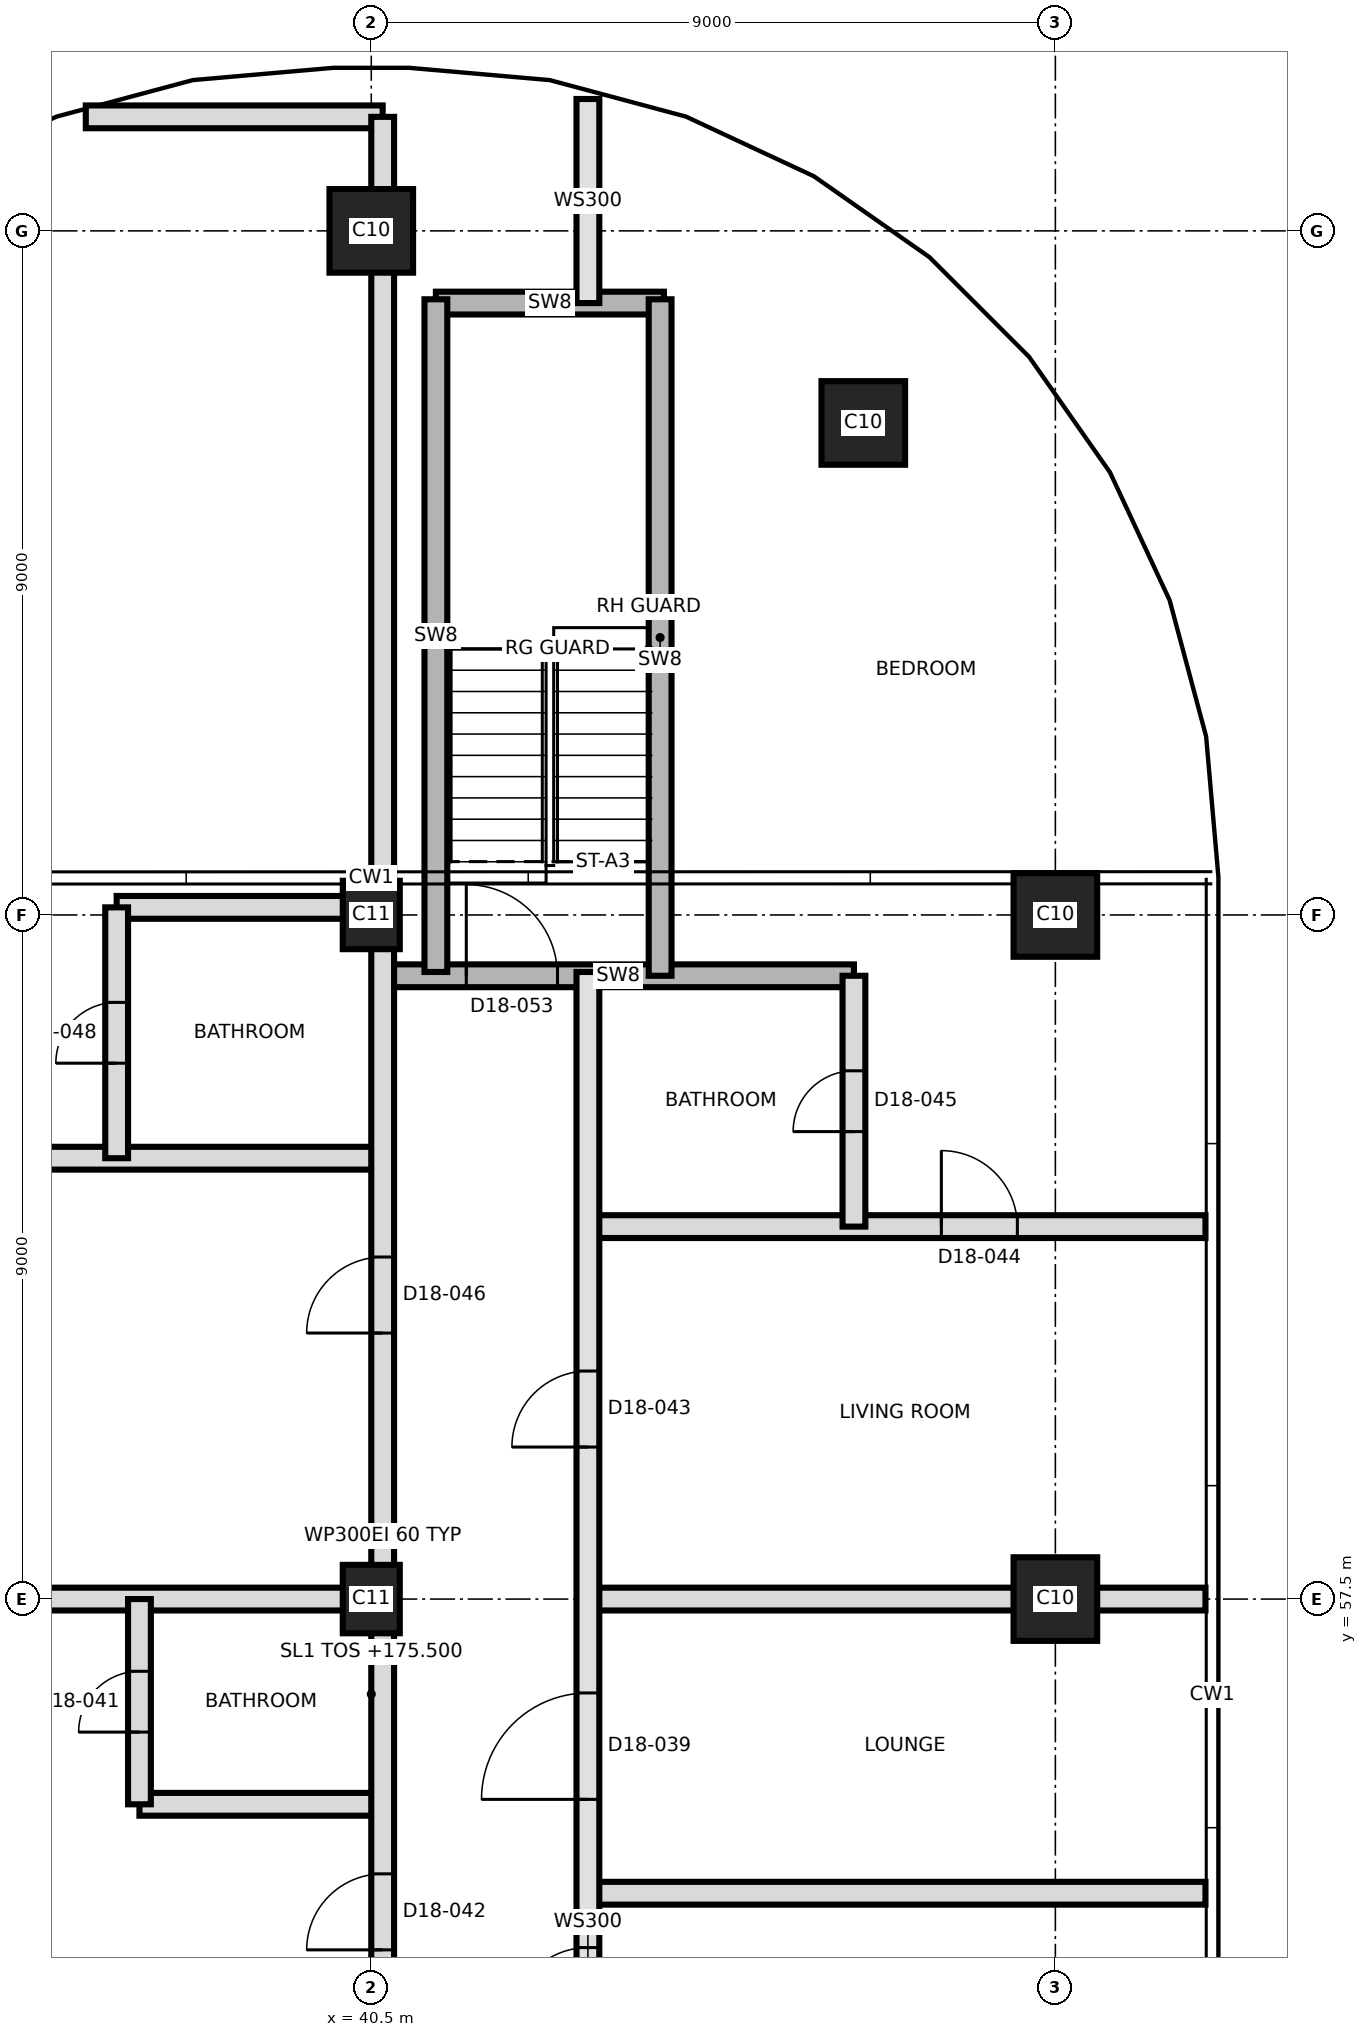
"""IFC4 building model, lengths in metres.
Left out: names, types, materials, properties, quantities, classifications, styles, units other than length and angle.
Written with IfcOpenShell. Run it as: python <this file> out.ifc"""

import sys

from ifc_helpers import new_model, si_unit, direction, frame, frame_2d, origin, origin_2d, place, context, subcontext, project, spatial, rectangle, extrude, element, fill, save


model = new_model("IFC4")
c1 = context("Model", 3, precision=1e-05, world=origin(), true_north=direction((0.0, 1.0)))
c2 = subcontext(c1, "Body", "Model", "MODEL_VIEW")
j1 = project(units=[si_unit("LENGTHUNIT", "METRE"), si_unit("PLANEANGLEUNIT", "RADIAN")], contexts=[c1])
p1 = place(None, origin())
s1 = spatial("IfcSite", under=j1, at=p1, CompositionType="ELEMENT")
p2 = place(p1, origin())
s2 = spatial("IfcBuilding", under=s1, at=p2, CompositionType="ELEMENT")
p3 = place(p2, frame((0.0, 0.0, 175.5)))
s3 = spatial("IfcBuildingStorey", under=s2, at=p3, CompositionType="ELEMENT", Elevation=175.5)
p4 = place(p3, frame((40.5, 57.5, 0.0), z_axis=(0.0, 0.0, 1.0), x_axis=(0.0, 1.0, 0.0)))
e1 = element("IfcColumn", 1, at=p4, inside=s3, PredefinedType="COLUMN", context=c2, shape_type="SweptSolid", body=[
    extrude(rectangle(XDim=0.9, YDim=0.75, at=origin_2d()), origin(), (0.0, 0.0, 1.0), 3.7),
])
p5 = place(p3, frame((49.5, 57.5, 0.0), z_axis=(0.0, 0.0, 1.0), x_axis=(1.0, 0.0, 0.0)))
e2 = element("IfcColumn", 2, at=p5, inside=s3, PredefinedType="COLUMN", context=c2, shape_type="SweptSolid", body=[
    extrude(rectangle(XDim=1.1, YDim=1.1, at=origin_2d()), origin(), (0.0, 0.0, 1.0), 3.7),
])
p6 = place(p3, frame((40.5, 66.5, 0.0), z_axis=(0.0, 0.0, 1.0), x_axis=(0.0, 1.0, 0.0)))
e3 = element("IfcColumn", 3, at=p6, inside=s3, PredefinedType="COLUMN", context=c2, shape_type="SweptSolid", body=[
    extrude(rectangle(XDim=0.9, YDim=0.75, at=origin_2d()), origin(), (0.0, 0.0, 1.0), 3.7),
])
for number, where, z_axis, x_axis in (
    (4, (49.5, 66.5, 0.0), (0.0, 0.0, 1.0), (1.0, 0.0, 0.0)),
    (5, (46.973, 72.973, 0.0), (0.0, 0.0, 1.0), (1.0, 0.0, 0.0)),
    (6, (40.5, 75.5, 0.0), (0.0, 0.0, 1.0), (1.0, 0.0, 0.0)),
):
    element("IfcColumn", number, at=place(p3, frame(where, z_axis=z_axis, x_axis=x_axis)), inside=s3, PredefinedType="COLUMN", context=c2, shape_type="SweptSolid", body=[
        extrude(rectangle(XDim=1.1, YDim=1.1, at=origin_2d()), origin(), (0.0, 0.0, 1.0), 3.7),
    ])
p7 = place(p3, frame((43.35, 53.63, 0.0), z_axis=(0.0, 0.0, 1.0), x_axis=(1.0, 0.0, 0.0)))
e7 = element("IfcWall", 7, at=p7, inside=s3, PredefinedType="PARTITIONING", context=c2, shape_type="SweptSolid", body=[
    extrude(rectangle(XDim=8.125, YDim=0.3, at=frame_2d((4.062, 0.0))), origin(), (0.0, 0.0, 1.0), 3.4),
])
p8 = place(p3, frame((37.45, 54.8, 0.0), z_axis=(0.0, 0.0, 1.0), x_axis=(1.0, 0.0, 0.0)))
e8 = element("IfcWall", 8, at=p8, inside=s3, PredefinedType="PARTITIONING", context=c2, shape_type="SweptSolid", body=[
    extrude(rectangle(XDim=3.2, YDim=0.3, at=frame_2d((1.6, 0.0))), origin(), (0.0, 0.0, 1.0), 3.4),
])
p9 = place(p3, frame((29.705, 57.5, 0.0), z_axis=(0.0, 0.0, 1.0), x_axis=(1.0, 0.0, 0.0)))
e9 = element("IfcWall", 9, at=p9, inside=s3, PredefinedType="PARTITIONING", context=c2, shape_type="SweptSolid", body=[
    extrude(rectangle(XDim=10.945, YDim=0.3, at=frame_2d((5.472, 0.0))), origin(), (0.0, 0.0, 1.0), 3.4),
])
p10 = place(p3, frame((43.35, 57.5, 0.0), z_axis=(0.0, 0.0, 1.0), x_axis=(1.0, 0.0, 0.0)))
e10 = element("IfcWall", 10, at=p10, inside=s3, PredefinedType="PARTITIONING", context=c2, shape_type="SweptSolid", body=[
    extrude(rectangle(XDim=8.125, YDim=0.3, at=frame_2d((4.062, 0.0))), origin(), (0.0, 0.0, 1.0), 3.4),
])
p11 = place(p3, frame((43.35, 62.4, 0.0), z_axis=(0.0, 0.0, 1.0), x_axis=(1.0, 0.0, 0.0)))
e11 = element("IfcWall", 11, at=p11, inside=s3, PredefinedType="PARTITIONING", context=c2, shape_type="SweptSolid", body=[
    extrude(rectangle(XDim=8.125, YDim=0.3, at=frame_2d((4.062, 0.0))), origin(), (0.0, 0.0, 1.0), 3.4),
])
p12 = place(p11, frame((4.65, 0.0, 0.0)))
e12 = element("IfcOpeningElement", 12, at=p12, cuts=e11, PredefinedType="OPENING", context=c2, shape_type="SweptSolid", body=[
    extrude(rectangle(XDim=1.0, YDim=2.1, at=frame_2d((0.5, 1.05))), frame((0.0, 0.16, 0.0), z_axis=(0.0, -1.0, 0.0), x_axis=(1.0, 0.0, 0.0)), (0.0, 0.0, 1.0), 0.32),
])
p13 = place(p3, frame((29.705, 63.3, 0.0), z_axis=(0.0, 0.0, 1.0), x_axis=(1.0, 0.0, 0.0)))
e13 = element("IfcWall", 13, at=p13, inside=s3, PredefinedType="PARTITIONING", context=c2, shape_type="SweptSolid", body=[
    extrude(rectangle(XDim=10.945, YDim=0.3, at=frame_2d((5.472, 0.0))), origin(), (0.0, 0.0, 1.0), 3.4),
])
p14 = place(p13, frame((5.295, 0.0, 0.0)))
e14 = element("IfcOpeningElement", 14, at=p14, cuts=e13, PredefinedType="OPENING", context=c2, shape_type="SweptSolid", body=[
    extrude(rectangle(XDim=1.0, YDim=2.1, at=frame_2d((0.5, 1.05))), frame((0.0, 0.16, 0.0), z_axis=(0.0, -1.0, 0.0), x_axis=(1.0, 0.0, 0.0)), (0.0, 0.0, 1.0), 0.32),
])
p15 = place(p3, frame((40.65, 65.7, 0.0), z_axis=(0.0, 0.0, 1.0), x_axis=(1.0, 0.0, 0.0)))
e15 = element("IfcWall", 15, at=p15, inside=s3, PredefinedType="SHEAR", context=c2, shape_type="SweptSolid", body=[
    extrude(rectangle(XDim=6.2, YDim=0.3, at=frame_2d((3.1, 0.0))), origin(), (0.0, 0.0, 1.0), 3.4),
])
p16 = place(p15, frame((1.1, 0.0, 0.0)))
e16 = element("IfcOpeningElement", 16, at=p16, cuts=e15, PredefinedType="OPENING", context=c2, shape_type="SweptSolid", body=[
    extrude(rectangle(XDim=1.2, YDim=2.1, at=frame_2d((0.6, 1.05))), frame((0.0, 0.16, 0.0), z_axis=(0.0, -1.0, 0.0), x_axis=(1.0, 0.0, 0.0)), (0.0, 0.0, 1.0), 0.32),
])
p17 = place(p3, frame((37.15, 66.6, 0.0), z_axis=(0.0, 0.0, 1.0), x_axis=(1.0, 0.0, 0.0)))
e17 = element("IfcWall", 17, at=p17, inside=s3, PredefinedType="PARTITIONING", context=c2, shape_type="SweptSolid", body=[
    extrude(rectangle(XDim=3.5, YDim=0.3, at=frame_2d((1.75, 0.0))), origin(), (0.0, 0.0, 1.0), 3.4),
])
p18 = place(p3, frame((41.35, 74.55, 0.0), z_axis=(0.0, 0.0, 1.0), x_axis=(1.0, 0.0, 0.0)))
e18 = element("IfcWall", 18, at=p18, inside=s3, PredefinedType="SHEAR", context=c2, shape_type="SweptSolid", body=[
    extrude(rectangle(XDim=3.0, YDim=0.3, at=frame_2d((1.5, 0.0))), origin(), (0.0, 0.0, 1.0), 3.4),
])
p19 = place(p3, frame((36.744, 77.0, 0.0), z_axis=(0.0, 0.0, 1.0), x_axis=(1.0, 0.0, 0.0)))
e19 = element("IfcWall", 19, at=p19, inside=s3, PredefinedType="PARTITIONING", context=c2, shape_type="SweptSolid", body=[
    extrude(rectangle(XDim=3.906, YDim=0.3, at=frame_2d((1.953, 0.0))), origin(), (0.0, 0.0, 1.0), 3.4),
])
p20 = place(p3, frame((37.15, 63.3, 0.0), z_axis=(0.0, 0.0, 1.0), x_axis=(0.0, 1.0, 0.0)))
e20 = element("IfcWall", 20, at=p20, inside=s3, PredefinedType="PARTITIONING", context=c2, shape_type="SweptSolid", body=[
    extrude(rectangle(XDim=3.3, YDim=0.3, at=frame_2d((1.65, 0.0))), origin(), (0.0, 0.0, 1.0), 3.4),
])
p21 = place(p20, frame((1.25, 0.0, 0.0)))
e21 = element("IfcOpeningElement", 21, at=p21, cuts=e20, PredefinedType="OPENING", context=c2, shape_type="SweptSolid", body=[
    extrude(rectangle(XDim=0.8, YDim=2.1, at=frame_2d((0.4, 1.05))), frame((0.0, 0.16, 0.0), z_axis=(0.0, -1.0, 0.0), x_axis=(1.0, 0.0, 0.0)), (0.0, 0.0, 1.0), 0.32),
])
p22 = place(p3, frame((37.45, 54.8, 0.0), z_axis=(0.0, 0.0, 1.0), x_axis=(0.0, 1.0, 0.0)))
e22 = element("IfcWall", 22, at=p22, inside=s3, PredefinedType="PARTITIONING", context=c2, shape_type="SweptSolid", body=[
    extrude(rectangle(XDim=2.7, YDim=0.3, at=frame_2d((1.35, 0.0))), origin(), (0.0, 0.0, 1.0), 3.4),
])
p23 = place(p22, frame((0.95, 0.0, 0.0)))
e23 = element("IfcOpeningElement", 23, at=p23, cuts=e22, PredefinedType="OPENING", context=c2, shape_type="SweptSolid", body=[
    extrude(rectangle(XDim=0.8, YDim=2.1, at=frame_2d((0.4, 1.05))), frame((0.0, 0.16, 0.0), z_axis=(0.0, -1.0, 0.0), x_axis=(1.0, 0.0, 0.0)), (0.0, 0.0, 1.0), 0.32),
])
p24 = place(p3, frame((40.65, 39.65, 0.0), z_axis=(0.0, 0.0, 1.0), x_axis=(0.0, 1.0, 0.0)))
e24 = element("IfcWall", 24, at=p24, inside=s3, PredefinedType="PARTITIONING", context=c2, shape_type="SweptSolid", body=[
    extrude(rectangle(XDim=37.35, YDim=0.3, at=frame_2d((18.675, 0.0))), origin(), (0.0, 0.0, 1.0), 3.4),
])
p25 = place(p24, frame((1.0, 0.0, 0.0)))
e25 = element("IfcOpeningElement", 25, at=p25, cuts=e24, PredefinedType="OPENING", context=c2, shape_type="SweptSolid", body=[
    extrude(rectangle(XDim=1.0, YDim=2.1, at=frame_2d((0.5, 1.05))), frame((0.0, 0.16, 0.0), z_axis=(0.0, -1.0, 0.0), x_axis=(1.0, 0.0, 0.0)), (0.0, 0.0, 1.0), 0.32),
])
p26 = place(p24, frame((6.85, 0.0, 0.0)))
e26 = element("IfcOpeningElement", 26, at=p26, cuts=e24, PredefinedType="OPENING", context=c2, shape_type="SweptSolid", body=[
    extrude(rectangle(XDim=1.0, YDim=2.1, at=frame_2d((0.5, 1.05))), frame((0.0, 0.16, 0.0), z_axis=(0.0, -1.0, 0.0), x_axis=(1.0, 0.0, 0.0)), (0.0, 0.0, 1.0), 0.32),
])
p27 = place(p24, frame((9.985, 0.0, 0.0)))
e27 = element("IfcOpeningElement", 27, at=p27, cuts=e24, PredefinedType="OPENING", context=c2, shape_type="SweptSolid", body=[
    extrude(rectangle(XDim=1.2, YDim=2.1, at=frame_2d((0.6, 1.05))), frame((0.0, 0.16, 0.0), z_axis=(0.0, -1.0, 0.0), x_axis=(1.0, 0.0, 0.0)), (0.0, 0.0, 1.0), 0.32),
])
p28 = place(p24, frame((13.235, 0.0, 0.0)))
e28 = element("IfcOpeningElement", 28, at=p28, cuts=e24, PredefinedType="OPENING", context=c2, shape_type="SweptSolid", body=[
    extrude(rectangle(XDim=1.0, YDim=2.1, at=frame_2d((0.5, 1.05))), frame((0.0, 0.16, 0.0), z_axis=(0.0, -1.0, 0.0), x_axis=(1.0, 0.0, 0.0)), (0.0, 0.0, 1.0), 0.32),
])
p29 = place(p24, frame((21.35, 0.0, 0.0)))
e29 = element("IfcOpeningElement", 29, at=p29, cuts=e24, PredefinedType="OPENING", context=c2, shape_type="SweptSolid", body=[
    extrude(rectangle(XDim=1.0, YDim=2.4, at=frame_2d((0.5, 1.2))), frame((0.0, 0.16, 0.0), z_axis=(0.0, -1.0, 0.0), x_axis=(1.0, 0.0, 0.0)), (0.0, 0.0, 1.0), 0.32),
])
p30 = place(p3, frame((41.35, 65.75, 0.0), z_axis=(0.0, 0.0, 1.0), x_axis=(0.0, 1.0, 0.0)))
e30 = element("IfcWall", 30, at=p30, inside=s3, PredefinedType="SHEAR", context=c2, shape_type="SweptSolid", body=[
    extrude(rectangle(XDim=8.85, YDim=0.3, at=frame_2d((4.425, 0.0))), origin(), (0.0, 0.0, 1.0), 3.4),
])
p31 = place(p3, frame((43.35, 39.65, 0.0), z_axis=(0.0, 0.0, 1.0), x_axis=(0.0, 1.0, 0.0)))
e31 = element("IfcWall", 31, at=p31, inside=s3, PredefinedType="SOLIDWALL", context=c2, shape_type="SweptSolid", body=[
    extrude(rectangle(XDim=26.1, YDim=0.3, at=frame_2d((13.05, 0.0))), origin(), (0.0, 0.0, 1.0), 3.4),
])
p32 = place(p31, frame((0.985, 0.0, 0.0)))
e32 = element("IfcOpeningElement", 32, at=p32, cuts=e31, PredefinedType="OPENING", context=c2, shape_type="SweptSolid", body=[
    extrude(rectangle(XDim=1.2, YDim=2.1, at=frame_2d((0.6, 1.05))), frame((0.0, 0.16, 0.0), z_axis=(0.0, -1.0, 0.0), x_axis=(1.0, 0.0, 0.0)), (0.0, 0.0, 1.0), 0.32),
])
p33 = place(p31, frame((4.235, 0.0, 0.0)))
e33 = element("IfcOpeningElement", 33, at=p33, cuts=e31, PredefinedType="OPENING", context=c2, shape_type="SweptSolid", body=[
    extrude(rectangle(XDim=1.0, YDim=2.1, at=frame_2d((0.5, 1.05))), frame((0.0, 0.16, 0.0), z_axis=(0.0, -1.0, 0.0), x_axis=(1.0, 0.0, 0.0)), (0.0, 0.0, 1.0), 0.32),
])
p34 = place(p31, frame((12.265, 0.0, 0.0)))
e34 = element("IfcOpeningElement", 34, at=p34, cuts=e31, PredefinedType="OPENING", context=c2, shape_type="SweptSolid", body=[
    extrude(rectangle(XDim=1.0, YDim=2.1, at=frame_2d((0.5, 1.05))), frame((0.0, 0.16, 0.0), z_axis=(0.0, -1.0, 0.0), x_axis=(1.0, 0.0, 0.0)), (0.0, 0.0, 1.0), 0.32),
])
p35 = place(p31, frame((15.215, 0.0, 0.0)))
e35 = element("IfcOpeningElement", 35, at=p35, cuts=e31, PredefinedType="OPENING", context=c2, shape_type="SweptSolid", body=[
    extrude(rectangle(XDim=1.4, YDim=2.1, at=frame_2d((0.7, 1.05))), frame((0.0, 0.16, 0.0), z_axis=(0.0, -1.0, 0.0), x_axis=(1.0, 0.0, 0.0)), (0.0, 0.0, 1.0), 0.32),
])
p36 = place(p31, frame((19.85, 0.0, 0.0)))
e36 = element("IfcOpeningElement", 36, at=p36, cuts=e31, PredefinedType="OPENING", context=c2, shape_type="SweptSolid", body=[
    extrude(rectangle(XDim=1.0, YDim=2.4, at=frame_2d((0.5, 1.2))), frame((0.0, 0.16, 0.0), z_axis=(0.0, -1.0, 0.0), x_axis=(1.0, 0.0, 0.0)), (0.0, 0.0, 1.0), 0.32),
])
p37 = place(p3, frame((43.35, 74.55, 0.0), z_axis=(0.0, 0.0, 1.0), x_axis=(0.0, 1.0, 0.0)))
e37 = element("IfcWall", 37, at=p37, inside=s3, PredefinedType="SOLIDWALL", context=c2, shape_type="SweptSolid", body=[
    extrude(rectangle(XDim=2.685, YDim=0.3, at=frame_2d((1.343, 0.0))), origin(), (0.0, 0.0, 1.0), 3.4),
])
p38 = place(p3, frame((44.3, 65.7, 0.0), z_axis=(0.0, 0.0, 1.0), x_axis=(0.0, 1.0, 0.0)))
e38 = element("IfcWall", 38, at=p38, inside=s3, PredefinedType="SHEAR", context=c2, shape_type="SweptSolid", body=[
    extrude(rectangle(XDim=8.9, YDim=0.3, at=frame_2d((4.45, 0.0))), origin(), (0.0, 0.0, 1.0), 3.4),
])
p39 = place(p3, frame((46.85, 62.4, 0.0), z_axis=(0.0, 0.0, 1.0), x_axis=(0.0, 1.0, 0.0)))
e39 = element("IfcWall", 39, at=p39, inside=s3, PredefinedType="PARTITIONING", context=c2, shape_type="SweptSolid", body=[
    extrude(rectangle(XDim=3.3, YDim=0.3, at=frame_2d((1.65, 0.0))), origin(), (0.0, 0.0, 1.0), 3.4),
])
p40 = place(p39, frame((1.25, 0.0, 0.0)))
e40 = element("IfcOpeningElement", 40, at=p40, cuts=e39, PredefinedType="OPENING", context=c2, shape_type="SweptSolid", body=[
    extrude(rectangle(XDim=0.8, YDim=2.1, at=frame_2d((0.4, 1.05))), frame((0.0, 0.16, 0.0), z_axis=(0.0, -1.0, 0.0), x_axis=(1.0, 0.0, 0.0)), (0.0, 0.0, 1.0), 0.32),
])
p41 = place(p34, origin())
e41 = element("IfcDoor", 41, at=p41, inside=s3, OperationType="SINGLE_SWING_LEFT", PredefinedType="DOOR", context=c2, shape_type="SweptSolid", body=[
    extrude(rectangle(XDim=1.0, YDim=2.1, at=frame_2d((0.5, 1.05))), frame((0.0, 0.025, 0.0), z_axis=(0.0, -1.0, 0.0), x_axis=(1.0, 0.0, 0.0)), (0.0, 0.0, 1.0), 0.05),
])
fill(e34, e41)
p42 = place(p35, origin())
e42 = element("IfcDoor", 42, at=p42, inside=s3, OperationType="SINGLE_SWING_LEFT", PredefinedType="DOOR", context=c2, shape_type="SweptSolid", body=[
    extrude(rectangle(XDim=1.4, YDim=2.1, at=frame_2d((0.7, 1.05))), frame((0.0, 0.025, 0.0), z_axis=(0.0, -1.0, 0.0), x_axis=(1.0, 0.0, 0.0)), (0.0, 0.0, 1.0), 0.05),
])
fill(e35, e42)
p43 = place(p23, origin())
e43 = element("IfcDoor", 43, at=p43, inside=s3, OperationType="SINGLE_SWING_LEFT", PredefinedType="DOOR", context=c2, shape_type="SweptSolid", body=[
    extrude(rectangle(XDim=0.8, YDim=2.1, at=frame_2d((0.4, 1.05))), frame((0.0, 0.025, 0.0), z_axis=(0.0, -1.0, 0.0), x_axis=(1.0, 0.0, 0.0)), (0.0, 0.0, 1.0), 0.05),
])
fill(e23, e43)
p44 = place(p28, origin())
e44 = element("IfcDoor", 44, at=p44, inside=s3, OperationType="SINGLE_SWING_RIGHT", PredefinedType="DOOR", context=c2, shape_type="SweptSolid", body=[
    extrude(rectangle(XDim=1.0, YDim=2.1, at=frame_2d((0.5, 1.05))), frame((0.0, 0.025, 0.0), z_axis=(0.0, -1.0, 0.0), x_axis=(1.0, 0.0, 0.0)), (0.0, 0.0, 1.0), 0.05),
])
fill(e28, e44)
p45 = place(p36, origin())
e45 = element("IfcDoor", 45, at=p45, inside=s3, OperationType="SINGLE_SWING_LEFT", PredefinedType="DOOR", context=c2, shape_type="SweptSolid", body=[
    extrude(rectangle(XDim=1.0, YDim=2.4, at=frame_2d((0.5, 1.2))), frame((0.0, 0.025, 0.0), z_axis=(0.0, -1.0, 0.0), x_axis=(1.0, 0.0, 0.0)), (0.0, 0.0, 1.0), 0.05),
])
fill(e36, e45)
p46 = place(p12, origin())
e46 = element("IfcDoor", 46, at=p46, inside=s3, OperationType="SINGLE_SWING_RIGHT", PredefinedType="DOOR", context=c2, shape_type="SweptSolid", body=[
    extrude(rectangle(XDim=1.0, YDim=2.1, at=frame_2d((0.5, 1.05))), frame((0.0, 0.025, 0.0), z_axis=(0.0, -1.0, 0.0), x_axis=(1.0, 0.0, 0.0)), (0.0, 0.0, 1.0), 0.05),
])
fill(e12, e46)
p47 = place(p40, origin())
e47 = element("IfcDoor", 47, at=p47, inside=s3, OperationType="SINGLE_SWING_LEFT", PredefinedType="DOOR", context=c2, shape_type="SweptSolid", body=[
    extrude(rectangle(XDim=0.8, YDim=2.1, at=frame_2d((0.4, 1.05))), frame((0.0, 0.025, 0.0), z_axis=(0.0, -1.0, 0.0), x_axis=(1.0, 0.0, 0.0)), (0.0, 0.0, 1.0), 0.05),
])
fill(e40, e47)
p48 = place(p29, origin())
e48 = element("IfcDoor", 48, at=p48, inside=s3, OperationType="SINGLE_SWING_LEFT", PredefinedType="DOOR", context=c2, shape_type="SweptSolid", body=[
    extrude(rectangle(XDim=1.0, YDim=2.4, at=frame_2d((0.5, 1.2))), frame((0.0, 0.025, 0.0), z_axis=(0.0, -1.0, 0.0), x_axis=(1.0, 0.0, 0.0)), (0.0, 0.0, 1.0), 0.05),
])
fill(e29, e48)
p49 = place(p21, origin())
e49 = element("IfcDoor", 49, at=p49, inside=s3, OperationType="SINGLE_SWING_LEFT", PredefinedType="DOOR", context=c2, shape_type="SweptSolid", body=[
    extrude(rectangle(XDim=0.8, YDim=2.1, at=frame_2d((0.4, 1.05))), frame((0.0, 0.025, 0.0), z_axis=(0.0, -1.0, 0.0), x_axis=(1.0, 0.0, 0.0)), (0.0, 0.0, 1.0), 0.05),
])
fill(e21, e49)
p50 = place(p16, origin())
e50 = element("IfcDoor", 50, at=p50, inside=s3, OperationType="SINGLE_SWING_RIGHT", PredefinedType="DOOR", context=c2, shape_type="SweptSolid", body=[
    extrude(rectangle(XDim=1.2, YDim=2.1, at=frame_2d((0.6, 1.05))), frame((0.0, 0.025, 0.0), z_axis=(0.0, -1.0, 0.0), x_axis=(1.0, 0.0, 0.0)), (0.0, 0.0, 1.0), 0.05),
])
fill(e16, e50)
save(model, sys.argv[1])
